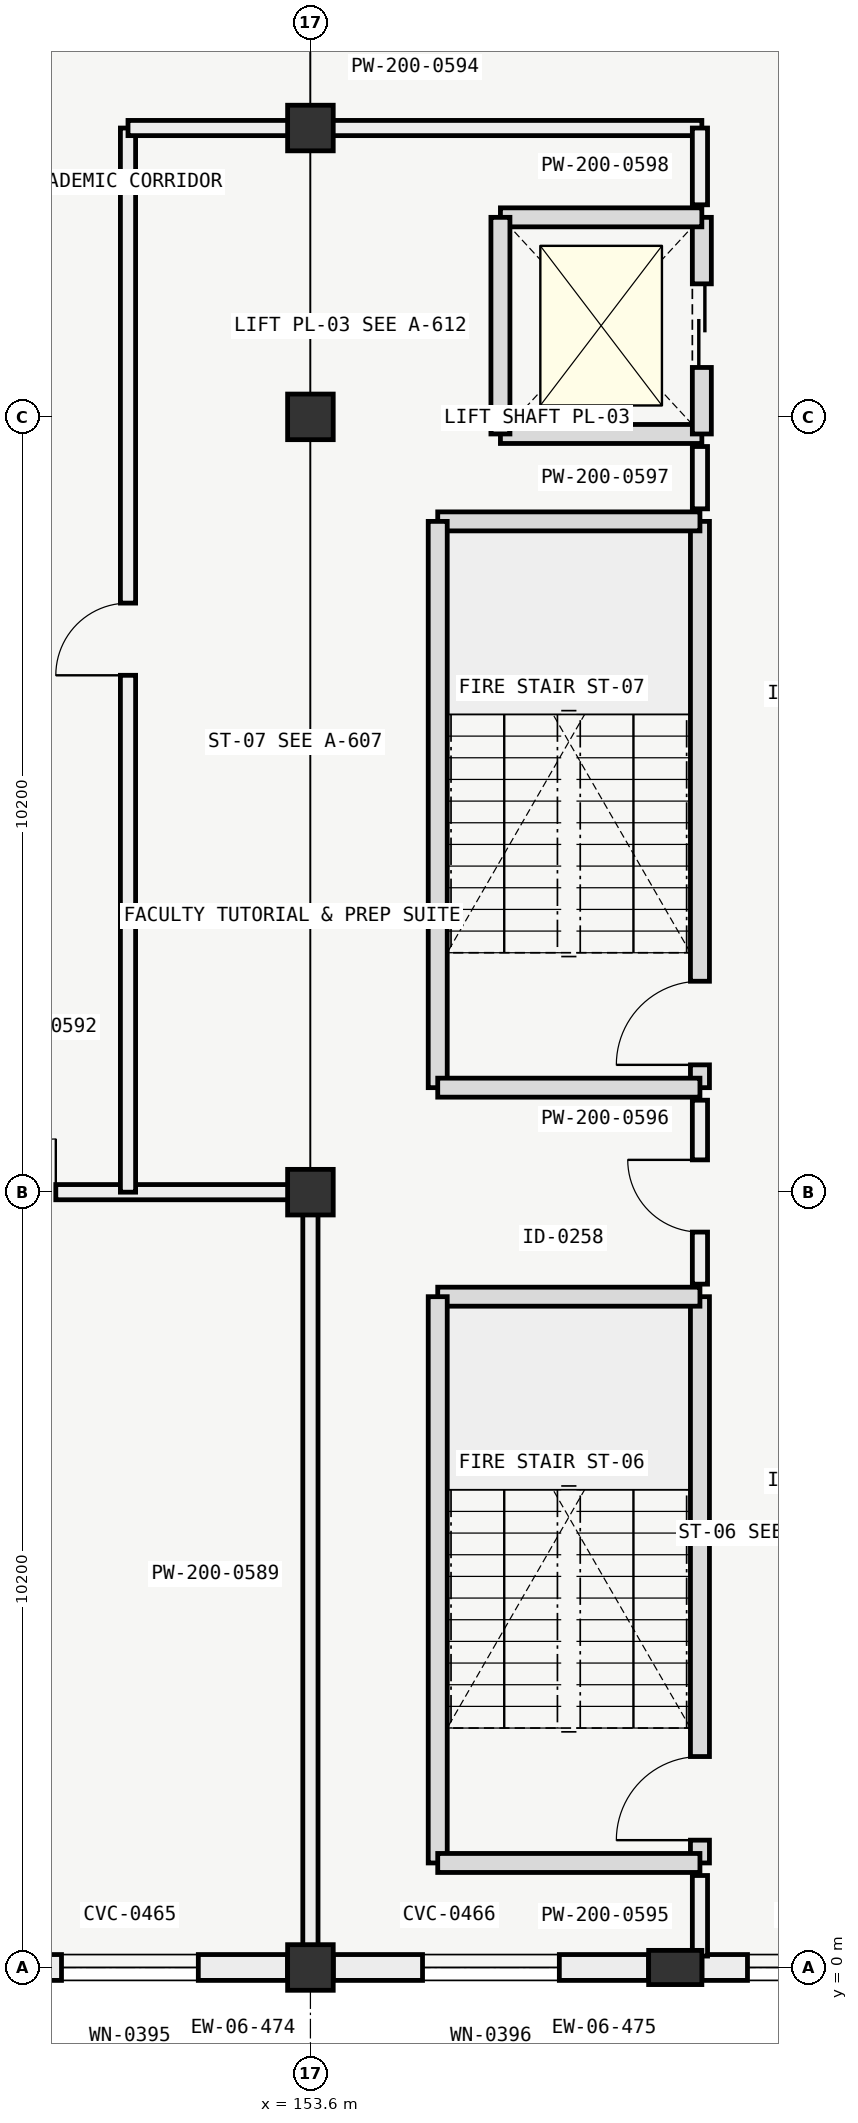
"""IFC4 building model, lengths in metres.
Left out: names, types, materials, properties, quantities, classifications, styles, units other than length and angle.
Written with IfcOpenShell. Run it as: python <this file> out.ifc"""

import sys

from ifc_helpers import new_model, si_unit, direction, frame, frame_2d, origin, origin_2d, place, context, subcontext, project, spatial, rectangle, extrude, element, fill, save


model = new_model("IFC4")
c1 = context("Model", 3, precision=1e-05, world=origin(), true_north=direction((0.0, 1.0)))
c2 = subcontext(c1, "Body", "Model", "MODEL_VIEW")
j1 = project(units=[si_unit("LENGTHUNIT", "METRE"), si_unit("PLANEANGLEUNIT", "RADIAN")], contexts=[c1])
p1 = place(None, origin())
s1 = spatial("IfcSite", under=j1, at=p1, CompositionType="ELEMENT")
p2 = place(p1, origin())
s2 = spatial("IfcBuilding", under=s1, at=p2, CompositionType="ELEMENT")
p3 = place(p2, frame((0.0, 0.0, 13.8)))
s3 = spatial("IfcBuildingStorey", under=s2, at=p3, CompositionType="ELEMENT", Elevation=13.8)
for number, where, z_axis, x_axis in (
    (1, (153.6, 0.0, 0.0), (0.0, 0.0, 1.0), (1.0, 0.0, 0.0)),
    (2, (153.6, 10.2, 0.0), (0.0, 0.0, 1.0), (1.0, 0.0, 0.0)),
    (3, (153.6, 20.4, 0.0), (0.0, 0.0, 1.0), (1.0, 0.0, 0.0)),
    (4, (153.6, 24.2, 0.0), (0.0, 0.0, 1.0), (1.0, 0.0, 0.0)),
):
    element("IfcColumn", number, at=place(p3, frame(where, z_axis=z_axis, x_axis=x_axis)), inside=s3, PredefinedType="COLUMN", context=c2, shape_type="SweptSolid", body=[
        extrude(rectangle(XDim=0.6, YDim=0.6, at=origin_2d()), origin(), (0.0, 0.0, 1.0), 4.2),
    ])
p4 = place(p3, frame((158.4, 0.0, 0.0), z_axis=(0.0, 0.0, 1.0), x_axis=(0.0, 1.0, 0.0)))
e5 = element("IfcColumn", 5, at=p4, inside=s3, PredefinedType="PILASTER", context=c2, shape_type="SweptSolid", body=[
    extrude(rectangle(XDim=0.45, YDim=0.7, at=origin_2d()), origin(), (0.0, 0.0, 1.0), 4.2),
])
p5 = place(p3, frame((153.299, 0.0, 0.0), z_axis=(0.0, 0.0, 1.0), x_axis=(-1.0, 0.0, 0.0)))
e6 = element("IfcWall", 6, at=p5, inside=s3, PredefinedType="SOLIDWALL", context=c2, shape_type="SweptSolid", body=[
    extrude(rectangle(XDim=4.148, YDim=0.34, at=frame_2d((2.074, 0.0))), origin(), (0.0, 0.0, 1.0), 3.28),
])
p6 = place(p5, frame((1.174, 0.0, 0.85)))
e7 = element("IfcOpeningElement", 7, at=p6, cuts=e6, PredefinedType="OPENING", context=c2, shape_type="SweptSolid", body=[
    extrude(rectangle(XDim=1.8, YDim=2.1, at=frame_2d((0.9, 1.05))), frame((0.0, 0.18, 0.0), z_axis=(0.0, -1.0, 0.0), x_axis=(1.0, 0.0, 0.0)), (0.0, 0.0, 1.0), 0.36),
])
p7 = place(p3, frame((158.049, 0.0, 0.0), z_axis=(0.0, 0.0, 1.0), x_axis=(-1.0, 0.0, 0.0)))
e8 = element("IfcWall", 8, at=p7, inside=s3, PredefinedType="SOLIDWALL", context=c2, shape_type="SweptSolid", body=[
    extrude(rectangle(XDim=4.148, YDim=0.34, at=frame_2d((2.074, 0.0))), origin(), (0.0, 0.0, 1.0), 3.28),
])
p8 = place(p7, frame((1.174, 0.0, 0.85)))
e9 = element("IfcOpeningElement", 9, at=p8, cuts=e8, PredefinedType="OPENING", context=c2, shape_type="SweptSolid", body=[
    extrude(rectangle(XDim=1.8, YDim=2.1, at=frame_2d((0.9, 1.05))), frame((0.0, 0.18, 0.0), z_axis=(0.0, -1.0, 0.0), x_axis=(1.0, 0.0, 0.0)), (0.0, 0.0, 1.0), 0.36),
])
p9 = place(p3, frame((161.95, 0.0, 0.0), z_axis=(0.0, 0.0, 1.0), x_axis=(-1.0, 0.0, 0.0)))
e10 = element("IfcWall", 10, at=p9, inside=s3, PredefinedType="SOLIDWALL", context=c2, shape_type="SweptSolid", body=[
    extrude(rectangle(XDim=3.199, YDim=0.34, at=frame_2d((1.6, 0.0))), origin(), (0.0, 0.0, 1.0), 3.28),
])
p10 = place(p9, frame((0.6, 0.0, 0.75)))
e11 = element("IfcOpeningElement", 11, at=p10, cuts=e10, PredefinedType="OPENING", context=c2, shape_type="SweptSolid", body=[
    extrude(rectangle(XDim=2.0, YDim=1.35, at=frame_2d((1.0, 0.675))), frame((0.0, 0.18, 0.0), z_axis=(0.0, -1.0, 0.0), x_axis=(1.0, 0.0, 0.0)), (0.0, 0.0, 1.0), 0.36),
])
p11 = place(p3, frame((158.725, 1.375, 0.0), z_axis=(0.0, 0.0, 1.0), x_axis=(0.0, 1.0, 0.0)))
e12 = element("IfcWall", 12, at=p11, inside=s3, PredefinedType="SOLIDWALL", context=c2, shape_type="SweptSolid", body=[
    extrude(rectangle(XDim=7.45, YDim=0.25, at=frame_2d((3.725, 0.0))), origin(), (0.0, 0.0, 1.0), 3.95),
])
p12 = place(p11, frame((0.3, 0.0, 0.0)))
e13 = element("IfcOpeningElement", 13, at=p12, cuts=e12, PredefinedType="OPENING", context=c2, shape_type="SweptSolid", body=[
    extrude(rectangle(XDim=1.1, YDim=2.2, at=frame_2d((0.55, 1.1))), frame((0.0, 0.135, 0.0), z_axis=(0.0, -1.0, 0.0), x_axis=(1.0, 0.0, 0.0)), (0.0, 0.0, 1.0), 0.27),
])
p13 = place(p3, frame((158.725, 8.825, 0.0), z_axis=(0.0, 0.0, 1.0), x_axis=(-1.0, 0.0, 0.0)))
e14 = element("IfcWall", 14, at=p13, inside=s3, PredefinedType="SOLIDWALL", context=c2, shape_type="SweptSolid", body=[
    extrude(rectangle(XDim=3.45, YDim=0.25, at=frame_2d((1.725, 0.0))), origin(), (0.0, 0.0, 1.0), 3.95),
])
p14 = place(p3, frame((155.275, 8.825, 0.0), z_axis=(0.0, 0.0, 1.0), x_axis=(0.0, -1.0, 0.0)))
e15 = element("IfcWall", 15, at=p14, inside=s3, PredefinedType="SOLIDWALL", context=c2, shape_type="SweptSolid", body=[
    extrude(rectangle(XDim=7.45, YDim=0.25, at=frame_2d((3.725, 0.0))), origin(), (0.0, 0.0, 1.0), 3.95),
])
p15 = place(p3, frame((155.275, 1.375, 0.0), z_axis=(0.0, 0.0, 1.0), x_axis=(1.0, 0.0, 0.0)))
e16 = element("IfcWall", 16, at=p15, inside=s3, PredefinedType="SOLIDWALL", context=c2, shape_type="SweptSolid", body=[
    extrude(rectangle(XDim=3.45, YDim=0.25, at=frame_2d((1.725, 0.0))), origin(), (0.0, 0.0, 1.0), 3.95),
])
p16 = place(p3, frame((158.725, 11.575, 0.0), z_axis=(0.0, 0.0, 1.0), x_axis=(0.0, 1.0, 0.0)))
e17 = element("IfcWall", 17, at=p16, inside=s3, PredefinedType="SOLIDWALL", context=c2, shape_type="SweptSolid", body=[
    extrude(rectangle(XDim=7.45, YDim=0.25, at=frame_2d((3.725, 0.0))), origin(), (0.0, 0.0, 1.0), 3.95),
])
p17 = place(p16, frame((0.3, 0.0, 0.0)))
e18 = element("IfcOpeningElement", 18, at=p17, cuts=e17, PredefinedType="OPENING", context=c2, shape_type="SweptSolid", body=[
    extrude(rectangle(XDim=1.1, YDim=2.2, at=frame_2d((0.55, 1.1))), frame((0.0, 0.135, 0.0), z_axis=(0.0, -1.0, 0.0), x_axis=(1.0, 0.0, 0.0)), (0.0, 0.0, 1.0), 0.27),
])
p18 = place(p3, frame((158.725, 19.025, 0.0), z_axis=(0.0, 0.0, 1.0), x_axis=(-1.0, 0.0, 0.0)))
e19 = element("IfcWall", 19, at=p18, inside=s3, PredefinedType="SOLIDWALL", context=c2, shape_type="SweptSolid", body=[
    extrude(rectangle(XDim=3.45, YDim=0.25, at=frame_2d((1.725, 0.0))), origin(), (0.0, 0.0, 1.0), 3.95),
])
p19 = place(p3, frame((155.275, 19.025, 0.0), z_axis=(0.0, 0.0, 1.0), x_axis=(0.0, -1.0, 0.0)))
e20 = element("IfcWall", 20, at=p19, inside=s3, PredefinedType="SOLIDWALL", context=c2, shape_type="SweptSolid", body=[
    extrude(rectangle(XDim=7.45, YDim=0.25, at=frame_2d((3.725, 0.0))), origin(), (0.0, 0.0, 1.0), 3.95),
])
p20 = place(p3, frame((155.275, 11.575, 0.0), z_axis=(0.0, 0.0, 1.0), x_axis=(1.0, 0.0, 0.0)))
e21 = element("IfcWall", 21, at=p20, inside=s3, PredefinedType="SOLIDWALL", context=c2, shape_type="SweptSolid", body=[
    extrude(rectangle(XDim=3.45, YDim=0.25, at=frame_2d((1.725, 0.0))), origin(), (0.0, 0.0, 1.0), 3.95),
])
p21 = place(p3, frame((156.1, 20.175, 0.0), z_axis=(0.0, 0.0, 1.0), x_axis=(1.0, 0.0, 0.0)))
e22 = element("IfcWall", 22, at=p21, inside=s3, PredefinedType="SOLIDWALL", context=c2, shape_type="SweptSolid", body=[
    extrude(rectangle(XDim=2.65, YDim=0.25, at=frame_2d((1.325, 0.0))), origin(), (0.0, 0.0, 1.0), 3.95),
])
p22 = place(p3, frame((158.75, 20.175, 0.0), z_axis=(0.0, 0.0, 1.0), x_axis=(0.0, 1.0, 0.0)))
e23 = element("IfcWall", 23, at=p22, inside=s3, PredefinedType="SOLIDWALL", context=c2, shape_type="SweptSolid", body=[
    extrude(rectangle(XDim=2.85, YDim=0.25, at=frame_2d((1.425, 0.0))), origin(), (0.0, 0.0, 1.0), 3.95),
])
p23 = place(p22, frame((0.875, 0.0, 0.0)))
e24 = element("IfcOpeningElement", 24, at=p23, cuts=e23, PredefinedType="OPENING", context=c2, shape_type="SweptSolid", body=[
    extrude(rectangle(XDim=1.1, YDim=2.1, at=frame_2d((0.55, 1.05))), frame((0.0, 0.135, 0.0), z_axis=(0.0, -1.0, 0.0), x_axis=(1.0, 0.0, 0.0)), (0.0, 0.0, 1.0), 0.27),
])
p24 = place(p3, frame((158.75, 23.025, 0.0), z_axis=(0.0, 0.0, 1.0), x_axis=(-1.0, 0.0, 0.0)))
e25 = element("IfcWall", 25, at=p24, inside=s3, PredefinedType="SOLIDWALL", context=c2, shape_type="SweptSolid", body=[
    extrude(rectangle(XDim=2.65, YDim=0.25, at=frame_2d((1.325, 0.0))), origin(), (0.0, 0.0, 1.0), 3.95),
])
p25 = place(p3, frame((156.1, 23.025, 0.0), z_axis=(0.0, 0.0, 1.0), x_axis=(0.0, -1.0, 0.0)))
e26 = element("IfcWall", 26, at=p25, inside=s3, PredefinedType="SOLIDWALL", context=c2, shape_type="SweptSolid", body=[
    extrude(rectangle(XDim=2.85, YDim=0.25, at=frame_2d((1.425, 0.0))), origin(), (0.0, 0.0, 1.0), 3.95),
])
p26 = place(p3, frame((134.55, 10.2, 0.0), z_axis=(0.0, 0.0, 1.0), x_axis=(1.0, 0.0, 0.0)))
e27 = element("IfcWall", 27, at=p26, inside=s3, PredefinedType="PARTITIONING", context=c2, shape_type="SweptSolid", body=[
    extrude(rectangle(XDim=19.05, YDim=0.2, at=frame_2d((9.525, 0.0))), origin(), (0.0, 0.0, 1.0), 3.23),
])
p27 = place(p26, frame((14.3, 0.0, 0.0)))
e28 = element("IfcOpeningElement", 28, at=p27, cuts=e27, PredefinedType="OPENING", context=c2, shape_type="SweptSolid", body=[
    extrude(rectangle(XDim=1.4, YDim=2.2, at=frame_2d((0.7, 1.1))), frame((0.0, 0.11, 0.0), z_axis=(0.0, -1.0, 0.0), x_axis=(1.0, 0.0, 0.0)), (0.0, 0.0, 1.0), 0.22),
])
p28 = place(p3, frame((153.6, 0.15, 0.0), z_axis=(0.0, 0.0, 1.0), x_axis=(0.0, 1.0, 0.0)))
e29 = element("IfcWall", 29, at=p28, inside=s3, PredefinedType="PARTITIONING", context=c2, shape_type="SweptSolid", body=[
    extrude(rectangle(XDim=10.05, YDim=0.2, at=frame_2d((5.025, 0.0))), origin(), (0.0, 0.0, 1.0), 3.23),
])
p29 = place(p3, frame((151.2, 10.2, 0.0), z_axis=(0.0, 0.0, 1.0), x_axis=(0.0, 1.0, 0.0)))
e30 = element("IfcWall", 30, at=p29, inside=s3, PredefinedType="PARTITIONING", context=c2, shape_type="SweptSolid", body=[
    extrude(rectangle(XDim=14.0, YDim=0.2, at=frame_2d((7.0, 0.0))), origin(), (0.0, 0.0, 1.0), 3.23),
])
p30 = place(p29, frame((6.8, 0.0, 0.0)))
e31 = element("IfcOpeningElement", 31, at=p30, cuts=e30, PredefinedType="OPENING", context=c2, shape_type="SweptSolid", body=[
    extrude(rectangle(XDim=0.95, YDim=2.1, at=frame_2d((0.475, 1.05))), frame((0.0, 0.11, 0.0), z_axis=(0.0, -1.0, 0.0), x_axis=(1.0, 0.0, 0.0)), (0.0, 0.0, 1.0), 0.22),
])
p31 = place(p3, frame((151.2, 24.2, 0.0), z_axis=(0.0, 0.0, 1.0), x_axis=(1.0, 0.0, 0.0)))
e32 = element("IfcWall", 32, at=p31, inside=s3, PredefinedType="PARTITIONING", context=c2, shape_type="SweptSolid", body=[
    extrude(rectangle(XDim=7.55, YDim=0.2, at=frame_2d((3.775, 0.0))), origin(), (0.0, 0.0, 1.0), 3.28),
])
p32 = place(p3, frame((158.725, 0.15, 0.0), z_axis=(0.0, 0.0, 1.0), x_axis=(0.0, 1.0, 0.0)))
e33 = element("IfcWall", 33, at=p32, inside=s3, PredefinedType="PARTITIONING", context=c2, shape_type="SweptSolid", body=[
    extrude(rectangle(XDim=1.06, YDim=0.2, at=frame_2d((0.53, 0.0))), origin(), (0.0, 0.0, 1.0), 3.85),
])
p33 = place(p3, frame((158.725, 8.99, 0.0), z_axis=(0.0, 0.0, 1.0), x_axis=(0.0, 1.0, 0.0)))
e34 = element("IfcWall", 34, at=p33, inside=s3, PredefinedType="PARTITIONING", context=c2, shape_type="SweptSolid", body=[
    extrude(rectangle(XDim=2.42, YDim=0.2, at=frame_2d((1.21, 0.0))), origin(), (0.0, 0.0, 1.0), 3.23),
])
p34 = place(p33, frame((0.685, 0.0, 0.0)))
e35 = element("IfcOpeningElement", 35, at=p34, cuts=e34, PredefinedType="OPENING", context=c2, shape_type="SweptSolid", body=[
    extrude(rectangle(XDim=0.95, YDim=2.1, at=frame_2d((0.475, 1.05))), frame((0.0, 0.11, 0.0), z_axis=(0.0, -1.0, 0.0), x_axis=(1.0, 0.0, 0.0)), (0.0, 0.0, 1.0), 0.22),
])
p35 = place(p3, frame((158.725, 19.19, 0.0), z_axis=(0.0, 0.0, 1.0), x_axis=(0.0, 1.0, 0.0)))
e36 = element("IfcWall", 36, at=p35, inside=s3, PredefinedType="PARTITIONING", context=c2, shape_type="SweptSolid", body=[
    extrude(rectangle(XDim=0.82, YDim=0.2, at=frame_2d((0.41, 0.0))), origin(), (0.0, 0.0, 1.0), 3.85),
])
p36 = place(p3, frame((158.725, 23.19, 0.0), z_axis=(0.0, 0.0, 1.0), x_axis=(0.0, 1.0, 0.0)))
e37 = element("IfcWall", 37, at=p36, inside=s3, PredefinedType="PARTITIONING", context=c2, shape_type="SweptSolid", body=[
    extrude(rectangle(XDim=1.01, YDim=0.2, at=frame_2d((0.505, 0.0))), origin(), (0.0, 0.0, 1.0), 3.85),
])
p37 = place(p6, origin())
e38 = element("IfcWindow", 38, at=p37, inside=s3, PartitioningType="SINGLE_PANEL", PredefinedType="WINDOW", context=c2, shape_type="SweptSolid", body=[
    extrude(rectangle(XDim=1.8, YDim=2.1, at=frame_2d((0.9, 1.05))), frame((0.0, 0.03, 0.0), z_axis=(0.0, -1.0, 0.0), x_axis=(1.0, 0.0, 0.0)), (0.0, 0.0, 1.0), 0.06),
])
fill(e7, e38)
p38 = place(p8, origin())
e39 = element("IfcWindow", 39, at=p38, inside=s3, PartitioningType="SINGLE_PANEL", PredefinedType="WINDOW", context=c2, shape_type="SweptSolid", body=[
    extrude(rectangle(XDim=1.8, YDim=2.1, at=frame_2d((0.9, 1.05))), frame((0.0, 0.03, 0.0), z_axis=(0.0, -1.0, 0.0), x_axis=(1.0, 0.0, 0.0)), (0.0, 0.0, 1.0), 0.06),
])
fill(e9, e39)
p39 = place(p10, origin())
e40 = element("IfcWindow", 40, at=p39, inside=s3, PartitioningType="SINGLE_PANEL", PredefinedType="WINDOW", context=c2, shape_type="SweptSolid", body=[
    extrude(rectangle(XDim=2.0, YDim=1.35, at=frame_2d((1.0, 0.675))), frame((0.0, 0.03, 0.0), z_axis=(0.0, -1.0, 0.0), x_axis=(1.0, 0.0, 0.0)), (0.0, 0.0, 1.0), 0.06),
])
fill(e11, e40)
p40 = place(p12, origin())
e41 = element("IfcDoor", 41, at=p40, inside=s3, OperationType="SINGLE_SWING_LEFT", PredefinedType="DOOR", context=c2, shape_type="SweptSolid", body=[
    extrude(rectangle(XDim=1.1, YDim=2.2, at=frame_2d((0.55, 1.1))), frame((0.0, 0.025, 0.0), z_axis=(0.0, -1.0, 0.0), x_axis=(1.0, 0.0, 0.0)), (0.0, 0.0, 1.0), 0.05),
])
fill(e13, e41)
p41 = place(p17, origin())
e42 = element("IfcDoor", 42, at=p41, inside=s3, OperationType="SINGLE_SWING_LEFT", PredefinedType="DOOR", context=c2, shape_type="SweptSolid", body=[
    extrude(rectangle(XDim=1.1, YDim=2.2, at=frame_2d((0.55, 1.1))), frame((0.0, 0.025, 0.0), z_axis=(0.0, -1.0, 0.0), x_axis=(1.0, 0.0, 0.0)), (0.0, 0.0, 1.0), 0.05),
])
fill(e18, e42)
p42 = place(p23, origin())
e43 = element("IfcDoor", 43, at=p42, inside=s3, OperationType="SLIDING_TO_LEFT", PredefinedType="DOOR", context=c2, shape_type="SweptSolid", body=[
    extrude(rectangle(XDim=1.1, YDim=2.1, at=frame_2d((0.55, 1.05))), frame((0.0, 0.025, 0.0), z_axis=(0.0, -1.0, 0.0), x_axis=(1.0, 0.0, 0.0)), (0.0, 0.0, 1.0), 0.05),
])
fill(e24, e43)
p43 = place(p27, origin())
e44 = element("IfcDoor", 44, at=p43, inside=s3, OperationType="DOUBLE_DOOR_SINGLE_SWING", PredefinedType="DOOR", context=c2, shape_type="SweptSolid", body=[
    extrude(rectangle(XDim=1.4, YDim=2.2, at=frame_2d((0.7, 1.1))), frame((0.0, 0.025, 0.0), z_axis=(0.0, -1.0, 0.0), x_axis=(1.0, 0.0, 0.0)), (0.0, 0.0, 1.0), 0.05),
])
fill(e28, e44)
p44 = place(p30, origin())
e45 = element("IfcDoor", 45, at=p44, inside=s3, OperationType="SINGLE_SWING_LEFT", PredefinedType="DOOR", context=c2, shape_type="SweptSolid", body=[
    extrude(rectangle(XDim=0.95, YDim=2.1, at=frame_2d((0.475, 1.05))), frame((0.0, 0.025, 0.0), z_axis=(0.0, -1.0, 0.0), x_axis=(1.0, 0.0, 0.0)), (0.0, 0.0, 1.0), 0.05),
])
fill(e31, e45)
p45 = place(p34, origin())
e46 = element("IfcDoor", 46, at=p45, inside=s3, OperationType="SINGLE_SWING_RIGHT", PredefinedType="DOOR", context=c2, shape_type="SweptSolid", body=[
    extrude(rectangle(XDim=0.95, YDim=2.1, at=frame_2d((0.475, 1.05))), frame((0.0, 0.025, 0.0), z_axis=(0.0, -1.0, 0.0), x_axis=(1.0, 0.0, 0.0)), (0.0, 0.0, 1.0), 0.05),
])
fill(e35, e46)
save(model, sys.argv[1])
